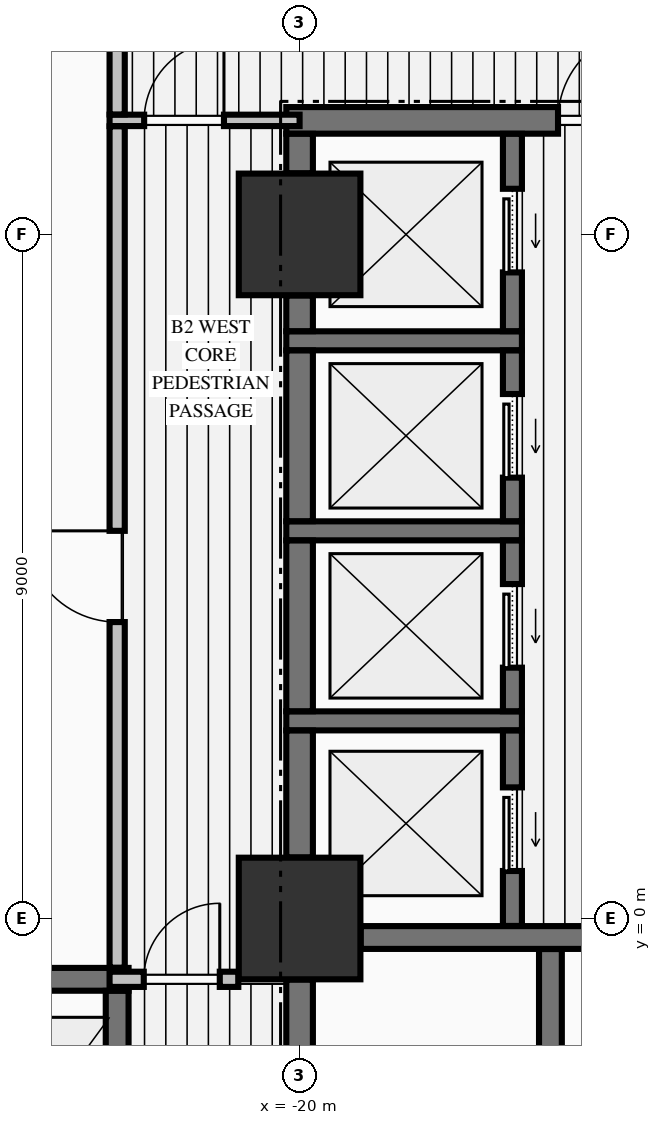
"""IFC4 building model, lengths in metres.
Left out: names, types, materials, properties, quantities, classifications, styles, units other than length and angle.
Written with IfcOpenShell. Run it as: python <this file> out.ifc"""

import sys

from ifc_helpers import new_model, si_unit, direction, frame, frame_2d, origin, origin_2d, place, context, subcontext, project, spatial, rectangle, extrude, element, fill, save


model = new_model("IFC4")
c1 = context("Model", 3, precision=1e-05, world=origin(), true_north=direction((0.0, 1.0)))
c2 = subcontext(c1, "Body", "Model", "MODEL_VIEW")
j1 = project(units=[si_unit("LENGTHUNIT", "METRE"), si_unit("PLANEANGLEUNIT", "RADIAN")], contexts=[c1])
p1 = place(None, origin())
s1 = spatial("IfcSite", under=j1, at=p1, CompositionType="ELEMENT")
p2 = place(p1, origin())
s2 = spatial("IfcBuilding", under=s1, at=p2, CompositionType="ELEMENT")
p3 = place(p2, frame((0.0, 0.0, -9.1)))
s3 = spatial("IfcBuildingStorey", under=s2, at=p3, CompositionType="ELEMENT", Elevation=-9.1)
for number, where, z_axis, x_axis in (
    (1, (-20.0, 0.0, -0.45), (0.0, 0.0, 1.0), (1.0, 0.0, 0.0)),
    (2, (-20.0, 9.0, -0.45), (0.0, 0.0, 1.0), (1.0, 0.0, 0.0)),
):
    element("IfcColumn", number, at=place(p3, frame(where, z_axis=z_axis, x_axis=x_axis)), inside=s3, PredefinedType="COLUMN", context=c2, shape_type="SweptSolid", body=[
        extrude(rectangle(XDim=1.6, YDim=1.6, at=origin_2d()), origin(), (0.0, 0.0, 1.0), 4.65),
    ])
p4 = place(p3, frame((-25.296, -0.8, 0.0), z_axis=(0.0, 0.0, 1.0), x_axis=(1.0, 0.0, 0.0)))
e3 = element("IfcWall", 3, at=p4, inside=s3, PredefinedType="SHEAR", context=c2, shape_type="SweptSolid", body=[
    extrude(rectangle(XDim=3.046, YDim=0.3, at=frame_2d((1.523, 0.0))), origin(), (0.0, 0.0, 1.0), 4.2),
])
p5 = place(p3, frame((-19.196, -0.25, 0.0), z_axis=(0.0, 0.0, 1.0), x_axis=(1.0, 0.0, 0.0)))
e4 = element("IfcWall", 4, at=p5, inside=s3, PredefinedType="SHEAR", context=c2, shape_type="SweptSolid", body=[
    extrude(rectangle(XDim=7.392, YDim=0.3, at=frame_2d((3.696, 0.0))), origin(), (0.0, 0.0, 1.0), 4.2),
])
p6 = place(p5, frame((5.496, 0.0, 0.0)))
e5 = element("IfcOpeningElement", 5, at=p6, cuts=e4, PredefinedType="OPENING", context=c2, shape_type="SweptSolid", body=[
    extrude(rectangle(XDim=1.1, YDim=2.15, at=frame_2d((0.55, 1.075))), frame((0.0, 0.16, 0.0), z_axis=(0.0, -1.0, 0.0), x_axis=(1.0, 0.0, 0.0)), (0.0, 0.0, 1.0), 0.32),
])
for number, where, z_axis, x_axis in (
    (6, (-20.175, 2.6, 0.0), (0.0, 0.0, 1.0), (1.0, 0.0, 0.0)),
    (7, (-20.175, 5.1, 0.0), (0.0, 0.0, 1.0), (1.0, 0.0, 0.0)),
    (8, (-20.175, 7.6, 0.0), (0.0, 0.0, 1.0), (1.0, 0.0, 0.0)),
):
    element("IfcWall", number, at=place(p3, frame(where, z_axis=z_axis, x_axis=x_axis)), inside=s3, PredefinedType="SOLIDWALL", context=c2, shape_type="SweptSolid", body=[
        extrude(rectangle(XDim=3.1, YDim=0.25, at=frame_2d((1.55, 0.0))), origin(), (0.0, 0.0, 1.0), 4.2),
    ])
p7 = place(p3, frame((-20.175, 10.5, 0.0), z_axis=(0.0, 0.0, 1.0), x_axis=(1.0, 0.0, 0.0)))
e9 = element("IfcWall", 9, at=p7, inside=s3, PredefinedType="SHEAR", context=c2, shape_type="SweptSolid", body=[
    extrude(rectangle(XDim=5.475, YDim=0.35, at=frame_2d((2.738, 0.0))), origin(), (0.0, 0.0, 1.0), 4.2),
])
p8 = place(p7, frame((3.575, 0.0, 0.0)))
e10 = element("IfcOpeningElement", 10, at=p8, cuts=e9, PredefinedType="OPENING", context=c2, shape_type="SweptSolid", body=[
    extrude(rectangle(XDim=1.2, YDim=2.15, at=frame_2d((0.6, 1.075))), frame((0.0, 0.185, 0.0), z_axis=(0.0, -1.0, 0.0), x_axis=(1.0, 0.0, 0.0)), (0.0, 0.0, 1.0), 0.37),
])
p9 = place(p3, frame((-22.5, -0.8, 0.0), z_axis=(0.0, 0.0, 1.0), x_axis=(1.0, 0.0, 0.0)))
e11 = element("IfcWall", 11, at=p9, inside=s3, PredefinedType="PARTITIONING", context=c2, shape_type="SweptSolid", body=[
    extrude(rectangle(XDim=1.694, YDim=0.2, at=frame_2d((0.847, 0.0))), origin(), (0.0, 0.0, 1.0), 4.2),
])
p10 = place(p9, frame((0.45, 0.0, 0.0)))
e12 = element("IfcOpeningElement", 12, at=p10, cuts=e11, PredefinedType="OPENING", context=c2, shape_type="SweptSolid", body=[
    extrude(rectangle(XDim=1.0, YDim=2.15, at=frame_2d((0.5, 1.075))), frame((0.0, 0.11, 0.0), z_axis=(0.0, -1.0, 0.0), x_axis=(1.0, 0.0, 0.0)), (0.0, 0.0, 1.0), 0.22),
])
p11 = place(p3, frame((-22.5, 10.5, 0.0), z_axis=(0.0, 0.0, 1.0), x_axis=(1.0, 0.0, 0.0)))
e13 = element("IfcWall", 13, at=p11, inside=s3, PredefinedType="PARTITIONING", context=c2, shape_type="SweptSolid", body=[
    extrude(rectangle(XDim=2.5, YDim=0.15, at=frame_2d((1.25, 0.0))), origin(), (0.0, 0.0, 1.0), 4.2),
])
p12 = place(p11, frame((0.455, 0.0, 0.0)))
e14 = element("IfcOpeningElement", 14, at=p12, cuts=e13, PredefinedType="OPENING", context=c2, shape_type="SweptSolid", body=[
    extrude(rectangle(XDim=1.05, YDim=2.15, at=frame_2d((0.525, 1.075))), frame((0.0, 0.085, 0.0), z_axis=(0.0, -1.0, 0.0), x_axis=(1.0, 0.0, 0.0)), (0.0, 0.0, 1.0), 0.17),
])
p13 = place(p3, frame((-22.4, -4.648, 0.0), z_axis=(0.0, 0.0, 1.0), x_axis=(0.0, 1.0, 0.0)))
e15 = element("IfcWall", 15, at=p13, inside=s3, PredefinedType="SHEAR", context=c2, shape_type="SweptSolid", body=[
    extrude(rectangle(XDim=3.696, YDim=0.3, at=frame_2d((1.848, 0.0))), origin(), (0.0, 0.0, 1.0), 4.2),
])
p14 = place(p13, frame((1.198, 0.0, 0.0)))
e16 = element("IfcOpeningElement", 16, at=p14, cuts=e15, PredefinedType="OPENING", context=c2, shape_type="SweptSolid", body=[
    extrude(rectangle(XDim=1.3, YDim=2.3, at=frame_2d((0.65, 1.15))), frame((0.0, 0.16, 0.0), z_axis=(0.0, -1.0, 0.0), x_axis=(1.0, 0.0, 0.0)), (0.0, 0.0, 1.0), 0.32),
])
p15 = place(p3, frame((-20.0, -8.196, 0.0), z_axis=(0.0, 0.0, 1.0), x_axis=(0.0, 1.0, 0.0)))
e17 = element("IfcWall", 17, at=p15, inside=s3, PredefinedType="SHEAR", context=c2, shape_type="SweptSolid", body=[
    extrude(rectangle(XDim=7.392, YDim=0.35, at=frame_2d((3.696, 0.0))), origin(), (0.0, 0.0, 1.0), 4.2),
])
p16 = place(p3, frame((-20.0, 0.804, 0.0), z_axis=(0.0, 0.0, 1.0), x_axis=(0.0, 1.0, 0.0)))
e18 = element("IfcWall", 18, at=p16, inside=s3, PredefinedType="SHEAR", context=c2, shape_type="SweptSolid", body=[
    extrude(rectangle(XDim=1.669, YDim=0.35, at=frame_2d((0.834, 0.0))), origin(), (0.0, 0.0, 1.0), 4.2),
])
for number, where, z_axis, x_axis in (
    (19, (-20.0, 2.727, 0.0), (0.0, 0.0, 1.0), (0.0, 1.0, 0.0)),
    (20, (-20.0, 5.227, 0.0), (0.0, 0.0, 1.0), (0.0, 1.0, 0.0)),
):
    element("IfcWall", number, at=place(p3, frame(where, z_axis=z_axis, x_axis=x_axis)), inside=s3, PredefinedType="SHEAR", context=c2, shape_type="SweptSolid", body=[
        extrude(rectangle(XDim=2.246, YDim=0.35, at=frame_2d((1.123, 0.0))), origin(), (0.0, 0.0, 1.0), 4.2),
    ])
p17 = place(p3, frame((-20.0, 7.727, 0.0), z_axis=(0.0, 0.0, 1.0), x_axis=(0.0, 1.0, 0.0)))
e21 = element("IfcWall", 21, at=p17, inside=s3, PredefinedType="SHEAR", context=c2, shape_type="SweptSolid", body=[
    extrude(rectangle(XDim=0.469, YDim=0.35, at=frame_2d((0.234, 0.0))), origin(), (0.0, 0.0, 1.0), 4.2),
])
p18 = place(p3, frame((-20.0, 9.804, 0.0), z_axis=(0.0, 0.0, 1.0), x_axis=(0.0, 1.0, 0.0)))
e22 = element("IfcWall", 22, at=p18, inside=s3, PredefinedType="SHEAR", context=c2, shape_type="SweptSolid", body=[
    extrude(rectangle(XDim=0.519, YDim=0.35, at=frame_2d((0.26, 0.0))), origin(), (0.0, 0.0, 1.0), 4.2),
])
p19 = place(p3, frame((-17.2, -0.098, 0.0), z_axis=(0.0, 0.0, 1.0), x_axis=(0.0, 1.0, 0.0)))
e23 = element("IfcWall", 23, at=p19, inside=s3, PredefinedType="SOLIDWALL", context=c2, shape_type="SweptSolid", body=[
    extrude(rectangle(XDim=2.571, YDim=0.25, at=frame_2d((1.285, 0.0))), origin(), (0.0, 0.0, 1.0), 4.2),
])
p20 = place(p19, frame((0.723, 0.0, 0.0)))
e24 = element("IfcOpeningElement", 24, at=p20, cuts=e23, PredefinedType="OPENING", context=c2, shape_type="SweptSolid", body=[
    extrude(rectangle(XDim=1.1, YDim=2.2, at=frame_2d((0.55, 1.1))), frame((0.0, 0.135, 0.0), z_axis=(0.0, -1.0, 0.0), x_axis=(1.0, 0.0, 0.0)), (0.0, 0.0, 1.0), 0.27),
])
p21 = place(p3, frame((-17.2, 2.727, 0.0), z_axis=(0.0, 0.0, 1.0), x_axis=(0.0, 1.0, 0.0)))
e25 = element("IfcWall", 25, at=p21, inside=s3, PredefinedType="SOLIDWALL", context=c2, shape_type="SweptSolid", body=[
    extrude(rectangle(XDim=2.246, YDim=0.25, at=frame_2d((1.123, 0.0))), origin(), (0.0, 0.0, 1.0), 4.2),
])
p22 = place(p21, frame((0.573, 0.0, 0.0)))
e26 = element("IfcOpeningElement", 26, at=p22, cuts=e25, PredefinedType="OPENING", context=c2, shape_type="SweptSolid", body=[
    extrude(rectangle(XDim=1.1, YDim=2.2, at=frame_2d((0.55, 1.1))), frame((0.0, 0.135, 0.0), z_axis=(0.0, -1.0, 0.0), x_axis=(1.0, 0.0, 0.0)), (0.0, 0.0, 1.0), 0.27),
])
p23 = place(p3, frame((-17.2, 5.227, 0.0), z_axis=(0.0, 0.0, 1.0), x_axis=(0.0, 1.0, 0.0)))
e27 = element("IfcWall", 27, at=p23, inside=s3, PredefinedType="SOLIDWALL", context=c2, shape_type="SweptSolid", body=[
    extrude(rectangle(XDim=2.246, YDim=0.25, at=frame_2d((1.123, 0.0))), origin(), (0.0, 0.0, 1.0), 4.2),
])
p24 = place(p23, frame((0.573, 0.0, 0.0)))
e28 = element("IfcOpeningElement", 28, at=p24, cuts=e27, PredefinedType="OPENING", context=c2, shape_type="SweptSolid", body=[
    extrude(rectangle(XDim=1.1, YDim=2.2, at=frame_2d((0.55, 1.1))), frame((0.0, 0.135, 0.0), z_axis=(0.0, -1.0, 0.0), x_axis=(1.0, 0.0, 0.0)), (0.0, 0.0, 1.0), 0.27),
])
p25 = place(p3, frame((-17.2, 7.727, 0.0), z_axis=(0.0, 0.0, 1.0), x_axis=(0.0, 1.0, 0.0)))
e29 = element("IfcWall", 29, at=p25, inside=s3, PredefinedType="SOLIDWALL", context=c2, shape_type="SweptSolid", body=[
    extrude(rectangle(XDim=2.596, YDim=0.25, at=frame_2d((1.298, 0.0))), origin(), (0.0, 0.0, 1.0), 4.2),
])
p26 = place(p25, frame((0.773, 0.0, 0.0)))
e30 = element("IfcOpeningElement", 30, at=p26, cuts=e29, PredefinedType="OPENING", context=c2, shape_type="SweptSolid", body=[
    extrude(rectangle(XDim=1.1, YDim=2.2, at=frame_2d((0.55, 1.1))), frame((0.0, 0.135, 0.0), z_axis=(0.0, -1.0, 0.0), x_axis=(1.0, 0.0, 0.0)), (0.0, 0.0, 1.0), 0.27),
])
p27 = place(p3, frame((-16.7, -9.773, 0.0), z_axis=(0.0, 0.0, 1.0), x_axis=(0.0, 1.0, 0.0)))
e31 = element("IfcWall", 31, at=p27, inside=s3, PredefinedType="SHEAR", context=c2, shape_type="SweptSolid", body=[
    extrude(rectangle(XDim=9.371, YDim=0.3, at=frame_2d((4.686, 0.0))), origin(), (0.0, 0.0, 1.0), 4.2),
])
p28 = place(p3, frame((-22.4, -0.647, 0.0), z_axis=(0.0, 0.0, 1.0), x_axis=(0.0, 1.0, 0.0)))
e32 = element("IfcWall", 32, at=p28, inside=s3, PredefinedType="PARTITIONING", context=c2, shape_type="SweptSolid", body=[
    extrude(rectangle(XDim=11.069, YDim=0.2, at=frame_2d((5.535, 0.0))), origin(), (0.0, 0.0, 1.0), 4.2),
])
p29 = place(p28, frame((4.547, 0.0, 0.0)))
e33 = element("IfcOpeningElement", 33, at=p29, cuts=e32, PredefinedType="OPENING", context=c2, shape_type="SweptSolid", body=[
    extrude(rectangle(XDim=1.2, YDim=2.15, at=frame_2d((0.6, 1.075))), frame((0.0, 0.11, 0.0), z_axis=(0.0, -1.0, 0.0), x_axis=(1.0, 0.0, 0.0)), (0.0, 0.0, 1.0), 0.22),
])
p30 = place(p3, frame((-22.4, 10.578, 0.0), z_axis=(0.0, 0.0, 1.0), x_axis=(0.0, 1.0, 0.0)))
e34 = element("IfcWall", 34, at=p30, inside=s3, PredefinedType="PARTITIONING", context=c2, shape_type="SweptSolid", body=[
    extrude(rectangle(XDim=2.544, YDim=0.2, at=frame_2d((1.272, 0.0))), origin(), (0.0, 0.0, 1.0), 4.2),
])
p31 = place(p8, origin())
e35 = element("IfcDoor", 35, at=p31, inside=s3, OperationType="SINGLE_SWING_RIGHT", PredefinedType="DOOR", context=c2, shape_type="SweptSolid", body=[
    extrude(rectangle(XDim=1.2, YDim=2.15, at=frame_2d((0.6, 1.075))), frame((0.0, 0.025, 0.0), z_axis=(0.0, -1.0, 0.0), x_axis=(1.0, 0.0, 0.0)), (0.0, 0.0, 1.0), 0.05),
])
fill(e10, e35)
p32 = place(p20, origin())
e36 = element("IfcDoor", 36, at=p32, inside=s3, OperationType="SLIDING_TO_LEFT", PredefinedType="DOOR", context=c2, shape_type="SweptSolid", body=[
    extrude(rectangle(XDim=1.1, YDim=2.2, at=frame_2d((0.55, 1.1))), frame((0.0, 0.025, 0.0), z_axis=(0.0, -1.0, 0.0), x_axis=(1.0, 0.0, 0.0)), (0.0, 0.0, 1.0), 0.05),
])
fill(e24, e36)
p33 = place(p22, origin())
e37 = element("IfcDoor", 37, at=p33, inside=s3, OperationType="SLIDING_TO_LEFT", PredefinedType="DOOR", context=c2, shape_type="SweptSolid", body=[
    extrude(rectangle(XDim=1.1, YDim=2.2, at=frame_2d((0.55, 1.1))), frame((0.0, 0.025, 0.0), z_axis=(0.0, -1.0, 0.0), x_axis=(1.0, 0.0, 0.0)), (0.0, 0.0, 1.0), 0.05),
])
fill(e26, e37)
p34 = place(p24, origin())
e38 = element("IfcDoor", 38, at=p34, inside=s3, OperationType="SLIDING_TO_LEFT", PredefinedType="DOOR", context=c2, shape_type="SweptSolid", body=[
    extrude(rectangle(XDim=1.1, YDim=2.2, at=frame_2d((0.55, 1.1))), frame((0.0, 0.025, 0.0), z_axis=(0.0, -1.0, 0.0), x_axis=(1.0, 0.0, 0.0)), (0.0, 0.0, 1.0), 0.05),
])
fill(e28, e38)
p35 = place(p26, origin())
e39 = element("IfcDoor", 39, at=p35, inside=s3, OperationType="SLIDING_TO_LEFT", PredefinedType="DOOR", context=c2, shape_type="SweptSolid", body=[
    extrude(rectangle(XDim=1.1, YDim=2.2, at=frame_2d((0.55, 1.1))), frame((0.0, 0.025, 0.0), z_axis=(0.0, -1.0, 0.0), x_axis=(1.0, 0.0, 0.0)), (0.0, 0.0, 1.0), 0.05),
])
fill(e30, e39)
p36 = place(p10, origin())
e40 = element("IfcDoor", 40, at=p36, inside=s3, OperationType="SINGLE_SWING_RIGHT", PredefinedType="DOOR", context=c2, shape_type="SweptSolid", body=[
    extrude(rectangle(XDim=1.0, YDim=2.15, at=frame_2d((0.5, 1.075))), frame((0.0, 0.025, 0.0), z_axis=(0.0, -1.0, 0.0), x_axis=(1.0, 0.0, 0.0)), (0.0, 0.0, 1.0), 0.05),
])
fill(e12, e40)
p37 = place(p12, origin())
e41 = element("IfcDoor", 41, at=p37, inside=s3, OperationType="SINGLE_SWING_RIGHT", PredefinedType="DOOR", context=c2, shape_type="SweptSolid", body=[
    extrude(rectangle(XDim=1.05, YDim=2.15, at=frame_2d((0.525, 1.075))), frame((0.0, 0.025, 0.0), z_axis=(0.0, -1.0, 0.0), x_axis=(1.0, 0.0, 0.0)), (0.0, 0.0, 1.0), 0.05),
])
fill(e14, e41)
p38 = place(p29, origin())
e42 = element("IfcDoor", 42, at=p38, inside=s3, OperationType="SINGLE_SWING_RIGHT", PredefinedType="DOOR", context=c2, shape_type="SweptSolid", body=[
    extrude(rectangle(XDim=1.2, YDim=2.15, at=frame_2d((0.6, 1.075))), frame((0.0, 0.025, 0.0), z_axis=(0.0, -1.0, 0.0), x_axis=(1.0, 0.0, 0.0)), (0.0, 0.0, 1.0), 0.05),
])
fill(e33, e42)
save(model, sys.argv[1])
